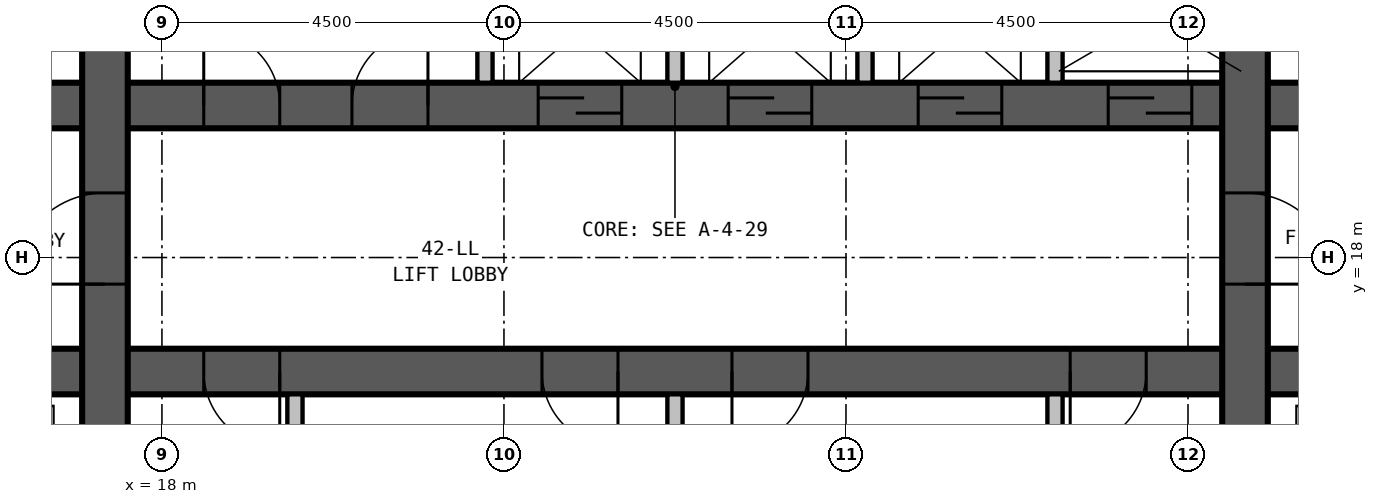
"""IFC4 building model, lengths in metres.
Left out: names, types, materials, properties, quantities, classifications, styles, units other than length and angle.
Written with IfcOpenShell. Run it as: python <this file> out.ifc"""

import sys

from ifc_helpers import new_model, si_unit, direction, frame, frame_2d, origin, place, context, subcontext, project, spatial, rectangle, extrude, element, fill, save


model = new_model("IFC4")
c1 = context("Model", 3, precision=1e-05, world=origin(), true_north=direction((0.0, 1.0)))
c2 = subcontext(c1, "Body", "Model", "MODEL_VIEW")
j1 = project(units=[si_unit("LENGTHUNIT", "METRE"), si_unit("PLANEANGLEUNIT", "RADIAN")], contexts=[c1])
p1 = place(None, origin())
s1 = spatial("IfcSite", under=j1, at=p1, CompositionType="ELEMENT")
p2 = place(p1, origin())
s2 = spatial("IfcBuilding", under=s1, at=p2, CompositionType="ELEMENT")
p3 = place(p2, frame((0.0, 0.0, 165.9)))
s3 = spatial("IfcBuildingStorey", under=s2, at=p3, CompositionType="ELEMENT", Elevation=165.9)
p4 = place(p3, frame((17.25, 13.8, 0.0), z_axis=(0.0, 0.0, 1.0), x_axis=(0.0, 1.0, 0.0)))
e1 = element("IfcWall", 1, at=p4, inside=s3, PredefinedType="SHEAR", context=c2, shape_type="SweptSolid", body=[
    extrude(rectangle(XDim=12.9, YDim=0.6, at=frame_2d((6.45, 0.0))), origin(), (0.0, 0.0, 1.0), 3.5),
])
p5 = place(p4, frame((3.85, 0.0, 0.0)))
e2 = element("IfcOpeningElement", 2, at=p5, cuts=e1, PredefinedType="OPENING", context=c2, shape_type="SweptSolid", body=[
    extrude(rectangle(XDim=1.2, YDim=2.1, at=frame_2d((0.6, 1.05))), frame((0.0, 0.31, 0.0), z_axis=(0.0, -1.0, 0.0), x_axis=(1.0, 0.0, 0.0)), (0.0, 0.0, 1.0), 0.62),
])
p6 = place(p3, frame((32.25, 13.8, 0.0), z_axis=(0.0, 0.0, 1.0), x_axis=(0.0, 1.0, 0.0)))
e3 = element("IfcWall", 3, at=p6, inside=s3, PredefinedType="SHEAR", context=c2, shape_type="SweptSolid", body=[
    extrude(rectangle(XDim=12.9, YDim=0.6, at=frame_2d((6.45, 0.0))), origin(), (0.0, 0.0, 1.0), 3.5),
])
p7 = place(p6, frame((5.05, 0.0, 0.0), z_axis=(0.0, 0.0, 1.0), x_axis=(-1.0, 0.0, 0.0)))
e4 = element("IfcOpeningElement", 4, at=p7, cuts=e3, PredefinedType="OPENING", context=c2, shape_type="SweptSolid", body=[
    extrude(rectangle(XDim=1.2, YDim=2.1, at=frame_2d((0.6, 1.05))), frame((0.0, 0.31, 0.0), z_axis=(0.0, -1.0, 0.0), x_axis=(1.0, 0.0, 0.0)), (0.0, 0.0, 1.0), 0.62),
])
p8 = place(p3, frame((13.8, 16.5, 0.0), z_axis=(0.0, 0.0, 1.0), x_axis=(1.0, 0.0, 0.0)))
e5 = element("IfcWall", 5, at=p8, inside=s3, PredefinedType="SHEAR", context=c2, shape_type="SweptSolid", body=[
    extrude(rectangle(XDim=21.9, YDim=0.6, at=frame_2d((10.95, 0.0))), origin(), (0.0, 0.0, 1.0), 3.5),
])
p9 = place(p8, frame((5.75, 0.0, 0.0), z_axis=(0.0, 0.0, 1.0), x_axis=(-1.0, 0.0, 0.0)))
e6 = element("IfcOpeningElement", 6, at=p9, cuts=e5, PredefinedType="OPENING", context=c2, shape_type="SweptSolid", body=[
    extrude(rectangle(XDim=1.0, YDim=2.1, at=frame_2d((0.5, 1.05))), frame((0.0, 0.31, 0.0), z_axis=(0.0, -1.0, 0.0), x_axis=(1.0, 0.0, 0.0)), (0.0, 0.0, 1.0), 0.62),
])
p10 = place(p8, frame((10.2, 0.0, 0.0), z_axis=(0.0, 0.0, 1.0), x_axis=(-1.0, 0.0, 0.0)))
e7 = element("IfcOpeningElement", 7, at=p10, cuts=e5, PredefinedType="OPENING", context=c2, shape_type="SweptSolid", body=[
    extrude(rectangle(XDim=1.0, YDim=2.1, at=frame_2d((0.5, 1.05))), frame((0.0, 0.31, 0.0), z_axis=(0.0, -1.0, 0.0), x_axis=(1.0, 0.0, 0.0)), (0.0, 0.0, 1.0), 0.62),
])
p11 = place(p8, frame((12.7, 0.0, 0.0), z_axis=(0.0, 0.0, 1.0), x_axis=(-1.0, 0.0, 0.0)))
e8 = element("IfcOpeningElement", 8, at=p11, cuts=e5, PredefinedType="OPENING", context=c2, shape_type="SweptSolid", body=[
    extrude(rectangle(XDim=1.0, YDim=2.1, at=frame_2d((0.5, 1.05))), frame((0.0, 0.31, 0.0), z_axis=(0.0, -1.0, 0.0), x_axis=(1.0, 0.0, 0.0)), (0.0, 0.0, 1.0), 0.62),
])
p12 = place(p8, frame((17.15, 0.0, 0.0), z_axis=(0.0, 0.0, 1.0), x_axis=(-1.0, 0.0, 0.0)))
e9 = element("IfcOpeningElement", 9, at=p12, cuts=e5, PredefinedType="OPENING", context=c2, shape_type="SweptSolid", body=[
    extrude(rectangle(XDim=1.0, YDim=2.1, at=frame_2d((0.5, 1.05))), frame((0.0, 0.31, 0.0), z_axis=(0.0, -1.0, 0.0), x_axis=(1.0, 0.0, 0.0)), (0.0, 0.0, 1.0), 0.62),
])
p13 = place(p8, frame((0.6, 0.0, 0.0)))
e10 = element("IfcOpeningElement", 10, at=p13, cuts=e5, PredefinedType="OPENING", context=c2, shape_type="SweptSolid", body=[
    extrude(rectangle(XDim=1.2, YDim=2.1, at=frame_2d((0.6, 1.05))), frame((0.0, 0.31, 0.0), z_axis=(0.0, -1.0, 0.0), x_axis=(1.0, 0.0, 0.0)), (0.0, 0.0, 1.0), 0.62),
])
p14 = place(p8, frame((19.6, 0.0, 0.0)))
e11 = element("IfcOpeningElement", 11, at=p14, cuts=e5, PredefinedType="OPENING", context=c2, shape_type="SweptSolid", body=[
    extrude(rectangle(XDim=1.2, YDim=2.1, at=frame_2d((0.6, 1.05))), frame((0.0, 0.31, 0.0), z_axis=(0.0, -1.0, 0.0), x_axis=(1.0, 0.0, 0.0)), (0.0, 0.0, 1.0), 0.62),
])
p15 = place(p3, frame((13.8, 20.0, 0.0), z_axis=(0.0, 0.0, 1.0), x_axis=(1.0, 0.0, 0.0)))
e12 = element("IfcWall", 12, at=p15, inside=s3, PredefinedType="SHEAR", context=c2, shape_type="SweptSolid", body=[
    extrude(rectangle(XDim=21.9, YDim=0.6, at=frame_2d((10.95, 0.0))), origin(), (0.0, 0.0, 1.0), 3.5),
])
p16 = place(p15, frame((0.5, 0.0, 0.0)))
e13 = element("IfcOpeningElement", 13, at=p16, cuts=e12, PredefinedType="OPENING", context=c2, shape_type="SweptSolid", body=[
    extrude(rectangle(XDim=1.0, YDim=2.1, at=frame_2d((0.5, 1.05))), frame((0.0, 0.31, 0.0), z_axis=(0.0, -1.0, 0.0), x_axis=(1.0, 0.0, 0.0)), (0.0, 0.0, 1.0), 0.62),
])
p17 = place(p15, frame((20.5, 0.0, 0.0)))
e14 = element("IfcOpeningElement", 14, at=p17, cuts=e12, PredefinedType="OPENING", context=c2, shape_type="SweptSolid", body=[
    extrude(rectangle(XDim=1.0, YDim=2.1, at=frame_2d((0.5, 1.05))), frame((0.0, 0.31, 0.0), z_axis=(0.0, -1.0, 0.0), x_axis=(1.0, 0.0, 0.0)), (0.0, 0.0, 1.0), 0.62),
])
p18 = place(p15, frame((9.15, 0.0, 0.0)))
e15 = element("IfcOpeningElement", 15, at=p18, cuts=e12, PredefinedType="OPENING", context=c2, shape_type="SweptSolid", body=[
    extrude(rectangle(XDim=1.1, YDim=2.1, at=frame_2d((0.55, 1.05))), frame((0.0, 0.31, 0.0), z_axis=(0.0, -1.0, 0.0), x_axis=(1.0, 0.0, 0.0)), (0.0, 0.0, 1.0), 0.62),
])
p19 = place(p15, frame((11.65, 0.0, 0.0)))
e16 = element("IfcOpeningElement", 16, at=p19, cuts=e12, PredefinedType="OPENING", context=c2, shape_type="SweptSolid", body=[
    extrude(rectangle(XDim=1.1, YDim=2.1, at=frame_2d((0.55, 1.05))), frame((0.0, 0.31, 0.0), z_axis=(0.0, -1.0, 0.0), x_axis=(1.0, 0.0, 0.0)), (0.0, 0.0, 1.0), 0.62),
])
p20 = place(p15, frame((14.15, 0.0, 0.0)))
e17 = element("IfcOpeningElement", 17, at=p20, cuts=e12, PredefinedType="OPENING", context=c2, shape_type="SweptSolid", body=[
    extrude(rectangle(XDim=1.1, YDim=2.1, at=frame_2d((0.55, 1.05))), frame((0.0, 0.31, 0.0), z_axis=(0.0, -1.0, 0.0), x_axis=(1.0, 0.0, 0.0)), (0.0, 0.0, 1.0), 0.62),
])
p21 = place(p15, frame((16.65, 0.0, 0.0)))
e18 = element("IfcOpeningElement", 18, at=p21, cuts=e12, PredefinedType="OPENING", context=c2, shape_type="SweptSolid", body=[
    extrude(rectangle(XDim=1.1, YDim=2.1, at=frame_2d((0.55, 1.05))), frame((0.0, 0.31, 0.0), z_axis=(0.0, -1.0, 0.0), x_axis=(1.0, 0.0, 0.0)), (0.0, 0.0, 1.0), 0.62),
])
p22 = place(p15, frame((4.75, 0.0, 0.0)))
e19 = element("IfcOpeningElement", 19, at=p22, cuts=e12, PredefinedType="OPENING", context=c2, shape_type="SweptSolid", body=[
    extrude(rectangle(XDim=1.0, YDim=2.1, at=frame_2d((0.5, 1.05))), frame((0.0, 0.31, 0.0), z_axis=(0.0, -1.0, 0.0), x_axis=(1.0, 0.0, 0.0)), (0.0, 0.0, 1.0), 0.62),
])
p23 = place(p15, frame((6.7, 0.0, 0.0)))
e20 = element("IfcOpeningElement", 20, at=p23, cuts=e12, PredefinedType="OPENING", context=c2, shape_type="SweptSolid", body=[
    extrude(rectangle(XDim=1.0, YDim=2.1, at=frame_2d((0.5, 1.05))), frame((0.0, 0.31, 0.0), z_axis=(0.0, -1.0, 0.0), x_axis=(1.0, 0.0, 0.0)), (0.0, 0.0, 1.0), 0.62),
])
p24 = place(p3, frame((19.75, 13.8, 0.0), z_axis=(0.0, 0.0, 1.0), x_axis=(0.0, 1.0, 0.0)))
e21 = element("IfcWall", 21, at=p24, inside=s3, PredefinedType="PARTITIONING", context=c2, shape_type="SweptSolid", body=[
    extrude(rectangle(XDim=2.4, YDim=0.2, at=frame_2d((1.2, 0.0))), origin(), (0.0, 0.0, 1.0), 3.25),
])
p25 = place(p3, frame((22.25, 20.3, 0.0), z_axis=(0.0, 0.0, 1.0), x_axis=(0.0, 1.0, 0.0)))
e22 = element("IfcWall", 22, at=p25, inside=s3, PredefinedType="PARTITIONING", context=c2, shape_type="SweptSolid", body=[
    extrude(rectangle(XDim=3.1, YDim=0.2, at=frame_2d((1.55, 0.0))), origin(), (0.0, 0.0, 1.0), 3.25),
])
p26 = place(p3, frame((24.75, 13.8, 0.0), z_axis=(0.0, 0.0, 1.0), x_axis=(0.0, 1.0, 0.0)))
e23 = element("IfcWall", 23, at=p26, inside=s3, PredefinedType="PARTITIONING", context=c2, shape_type="SweptSolid", body=[
    extrude(rectangle(XDim=2.4, YDim=0.2, at=frame_2d((1.2, 0.0))), origin(), (0.0, 0.0, 1.0), 3.25),
])
for number, where, z_axis, x_axis in (
    (24, (24.75, 20.3, 0.0), (0.0, 0.0, 1.0), (0.0, 1.0, 0.0)),
    (25, (27.25, 20.3, 0.0), (0.0, 0.0, 1.0), (0.0, 1.0, 0.0)),
):
    element("IfcWall", number, at=place(p3, frame(where, z_axis=z_axis, x_axis=x_axis)), inside=s3, PredefinedType="PARTITIONING", context=c2, shape_type="SweptSolid", body=[
        extrude(rectangle(XDim=3.1, YDim=0.2, at=frame_2d((1.55, 0.0))), origin(), (0.0, 0.0, 1.0), 3.25),
    ])
p27 = place(p3, frame((29.75, 13.8, 0.0), z_axis=(0.0, 0.0, 1.0), x_axis=(0.0, 1.0, 0.0)))
e26 = element("IfcWall", 26, at=p27, inside=s3, PredefinedType="PARTITIONING", context=c2, shape_type="SweptSolid", body=[
    extrude(rectangle(XDim=2.4, YDim=0.2, at=frame_2d((1.2, 0.0))), origin(), (0.0, 0.0, 1.0), 3.25),
])
p28 = place(p3, frame((29.75, 20.3, 0.0), z_axis=(0.0, 0.0, 1.0), x_axis=(0.0, 1.0, 0.0)))
e27 = element("IfcWall", 27, at=p28, inside=s3, PredefinedType="PARTITIONING", context=c2, shape_type="SweptSolid", body=[
    extrude(rectangle(XDim=3.1, YDim=0.2, at=frame_2d((1.55, 0.0))), origin(), (0.0, 0.0, 1.0), 3.25),
])
p29 = place(p5, origin())
e28 = element("IfcDoor", 28, at=p29, inside=s3, OperationType="SINGLE_SWING_LEFT", PredefinedType="DOOR", context=c2, shape_type="SweptSolid", body=[
    extrude(rectangle(XDim=1.2, YDim=2.1, at=frame_2d((0.6, 1.05))), frame((0.0, 0.3, 0.0), z_axis=(0.0, -1.0, 0.0), x_axis=(1.0, 0.0, 0.0)), (0.0, 0.0, 1.0), 0.6),
])
fill(e2, e28)
p30 = place(p7, origin())
e29 = element("IfcDoor", 29, at=p30, inside=s3, OperationType="SINGLE_SWING_RIGHT", PredefinedType="DOOR", context=c2, shape_type="SweptSolid", body=[
    extrude(rectangle(XDim=1.2, YDim=2.1, at=frame_2d((0.6, 1.05))), frame((0.0, 0.3, 0.0), z_axis=(0.0, -1.0, 0.0), x_axis=(1.0, 0.0, 0.0)), (0.0, 0.0, 1.0), 0.6),
])
fill(e4, e29)
p31 = place(p18, origin())
e30 = element("IfcDoor", 30, at=p31, inside=s3, OperationType="SLIDING_TO_LEFT", PredefinedType="DOOR", context=c2, shape_type="SweptSolid", body=[
    extrude(rectangle(XDim=1.1, YDim=2.1, at=frame_2d((0.55, 1.05))), frame((0.0, 0.3, 0.0), z_axis=(0.0, -1.0, 0.0), x_axis=(1.0, 0.0, 0.0)), (0.0, 0.0, 1.0), 0.6),
])
fill(e15, e30)
p32 = place(p19, origin())
e31 = element("IfcDoor", 31, at=p32, inside=s3, OperationType="SLIDING_TO_LEFT", PredefinedType="DOOR", context=c2, shape_type="SweptSolid", body=[
    extrude(rectangle(XDim=1.1, YDim=2.1, at=frame_2d((0.55, 1.05))), frame((0.0, 0.3, 0.0), z_axis=(0.0, -1.0, 0.0), x_axis=(1.0, 0.0, 0.0)), (0.0, 0.0, 1.0), 0.6),
])
fill(e16, e31)
p33 = place(p20, origin())
e32 = element("IfcDoor", 32, at=p33, inside=s3, OperationType="SLIDING_TO_LEFT", PredefinedType="DOOR", context=c2, shape_type="SweptSolid", body=[
    extrude(rectangle(XDim=1.1, YDim=2.1, at=frame_2d((0.55, 1.05))), frame((0.0, 0.3, 0.0), z_axis=(0.0, -1.0, 0.0), x_axis=(1.0, 0.0, 0.0)), (0.0, 0.0, 1.0), 0.6),
])
fill(e17, e32)
p34 = place(p21, origin())
e33 = element("IfcDoor", 33, at=p34, inside=s3, OperationType="SLIDING_TO_LEFT", PredefinedType="DOOR", context=c2, shape_type="SweptSolid", body=[
    extrude(rectangle(XDim=1.1, YDim=2.1, at=frame_2d((0.55, 1.05))), frame((0.0, 0.3, 0.0), z_axis=(0.0, -1.0, 0.0), x_axis=(1.0, 0.0, 0.0)), (0.0, 0.0, 1.0), 0.6),
])
fill(e18, e33)
p35 = place(p9, origin())
e34 = element("IfcDoor", 34, at=p35, inside=s3, OperationType="SINGLE_SWING_LEFT", PredefinedType="DOOR", context=c2, shape_type="SweptSolid", body=[
    extrude(rectangle(XDim=1.0, YDim=2.1, at=frame_2d((0.5, 1.05))), frame((0.0, 0.3, 0.0), z_axis=(0.0, -1.0, 0.0), x_axis=(1.0, 0.0, 0.0)), (0.0, 0.0, 1.0), 0.6),
])
fill(e6, e34)
p36 = place(p10, origin())
e35 = element("IfcDoor", 35, at=p36, inside=s3, OperationType="SINGLE_SWING_LEFT", PredefinedType="DOOR", context=c2, shape_type="SweptSolid", body=[
    extrude(rectangle(XDim=1.0, YDim=2.1, at=frame_2d((0.5, 1.05))), frame((0.0, 0.3, 0.0), z_axis=(0.0, -1.0, 0.0), x_axis=(1.0, 0.0, 0.0)), (0.0, 0.0, 1.0), 0.6),
])
fill(e7, e35)
p37 = place(p11, origin())
e36 = element("IfcDoor", 36, at=p37, inside=s3, OperationType="SINGLE_SWING_RIGHT", PredefinedType="DOOR", context=c2, shape_type="SweptSolid", body=[
    extrude(rectangle(XDim=1.0, YDim=2.1, at=frame_2d((0.5, 1.05))), frame((0.0, 0.3, 0.0), z_axis=(0.0, -1.0, 0.0), x_axis=(1.0, 0.0, 0.0)), (0.0, 0.0, 1.0), 0.6),
])
fill(e8, e36)
p38 = place(p12, origin())
e37 = element("IfcDoor", 37, at=p38, inside=s3, OperationType="SINGLE_SWING_RIGHT", PredefinedType="DOOR", context=c2, shape_type="SweptSolid", body=[
    extrude(rectangle(XDim=1.0, YDim=2.1, at=frame_2d((0.5, 1.05))), frame((0.0, 0.3, 0.0), z_axis=(0.0, -1.0, 0.0), x_axis=(1.0, 0.0, 0.0)), (0.0, 0.0, 1.0), 0.6),
])
fill(e9, e37)
p39 = place(p22, origin())
e38 = element("IfcDoor", 38, at=p39, inside=s3, OperationType="SINGLE_SWING_LEFT", PredefinedType="DOOR", context=c2, shape_type="SweptSolid", body=[
    extrude(rectangle(XDim=1.0, YDim=2.1, at=frame_2d((0.5, 1.05))), frame((0.0, 0.3, 0.0), z_axis=(0.0, -1.0, 0.0), x_axis=(1.0, 0.0, 0.0)), (0.0, 0.0, 1.0), 0.6),
])
fill(e19, e38)
p40 = place(p23, origin())
e39 = element("IfcDoor", 39, at=p40, inside=s3, OperationType="SINGLE_SWING_RIGHT", PredefinedType="DOOR", context=c2, shape_type="SweptSolid", body=[
    extrude(rectangle(XDim=1.0, YDim=2.1, at=frame_2d((0.5, 1.05))), frame((0.0, 0.3, 0.0), z_axis=(0.0, -1.0, 0.0), x_axis=(1.0, 0.0, 0.0)), (0.0, 0.0, 1.0), 0.6),
])
fill(e20, e39)
save(model, sys.argv[1])
